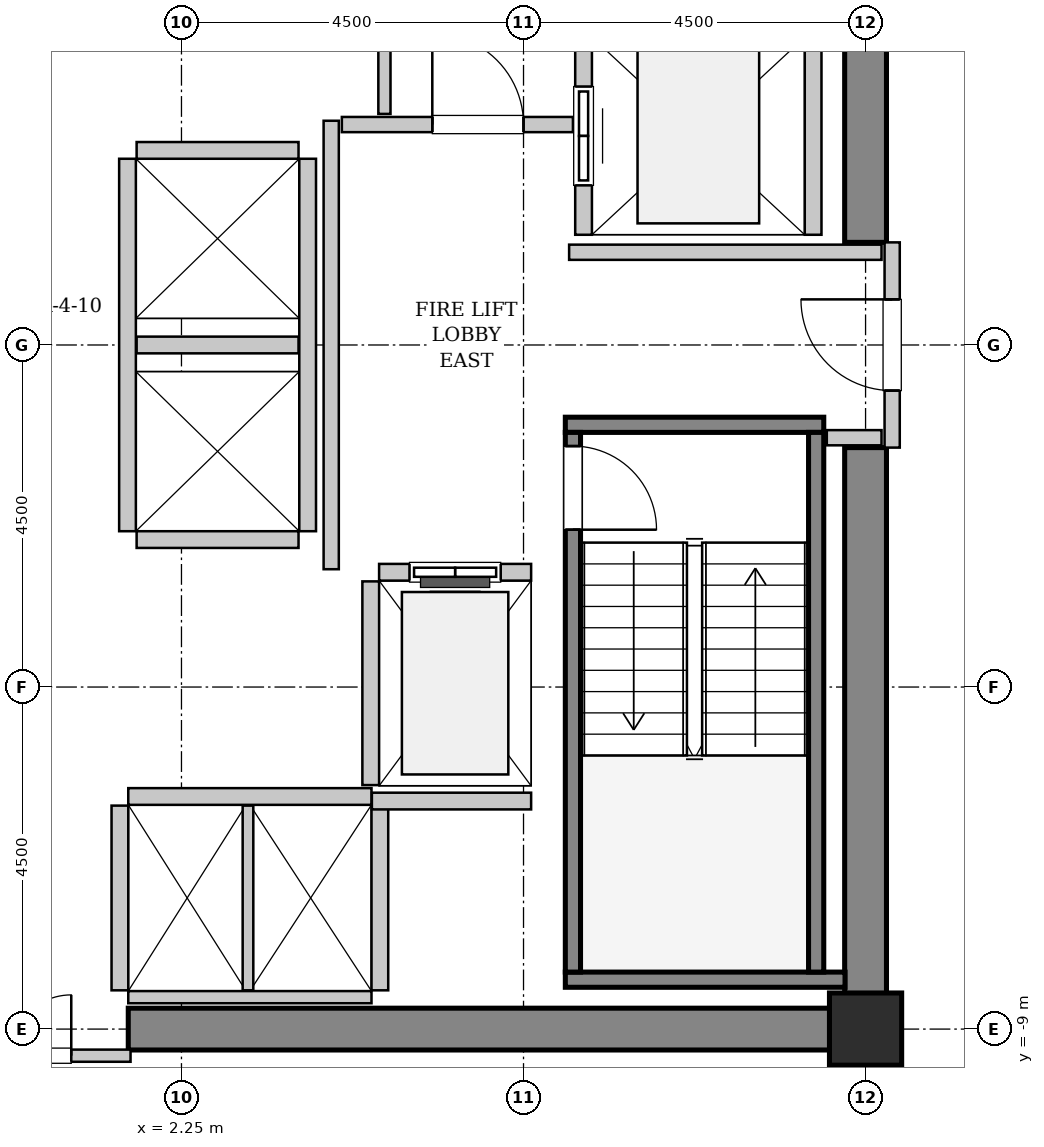
"""IFC4 building model, lengths in metres.
Left out: names, types, materials, properties, quantities, classifications, styles, units other than length and angle.
Written with IfcOpenShell. Run it as: python <this file> out.ifc"""

import sys

from ifc_helpers import new_model, si_unit, direction, frame, frame_2d, origin, origin_2d, place, context, subcontext, project, spatial, rectangle, hollow_rectangle, extrude, source, transform, mapped, element, fill, save


model = new_model("IFC4")
c1 = context("Model", 3, precision=1e-05, world=origin(), true_north=direction((0.0, 1.0)))
c2 = subcontext(c1, "Body", "Model", "MODEL_VIEW")
j1 = project(units=[si_unit("LENGTHUNIT", "METRE"), si_unit("PLANEANGLEUNIT", "RADIAN")], contexts=[c1])
p1 = place(None, origin())
s1 = spatial("IfcSite", under=j1, at=p1, CompositionType="ELEMENT")
p2 = place(p1, origin())
s2 = spatial("IfcBuilding", under=s1, at=p2, CompositionType="ELEMENT")
p3 = place(p2, frame((0.0, 0.0, 113.6)))
s3 = spatial("IfcBuildingStorey", under=s2, at=p3, CompositionType="ELEMENT", Elevation=113.6)
m1 = source(origin(), c2, "Body", "SweptSolid", [
    extrude(rectangle(XDim=9.975, YDim=0.55, at=frame_2d((4.987, 0.0))), origin(), (0.0, 0.0, 1.0), 3.8),
])
p4 = place(p3, frame((1.55, -9.0, 0.0), z_axis=(0.0, 0.0, 1.0), x_axis=(1.0, 0.0, 0.0)))
e1 = element("IfcWall", 1, at=p4, inside=s3, PredefinedType="SHEAR", context=c2, shape_type="MappedRepresentation", body=[
    mapped(m1, transform((0.0, 0.0, 0.0), x_axis=(1.0, 0.0, 0.0), y_axis=(0.0, 1.0, 0.0), z_axis=(0.0, 0.0, 1.0), scale=1.0)),
])
m2 = source(origin(), c2, "Body", "SweptSolid", [
    extrude(rectangle(XDim=7.375, YDim=0.55, at=frame_2d((3.688, 0.0))), origin(), (0.0, 0.0, 1.0), 3.8),
])
for number, where, z_axis, x_axis in (
    (2, (11.25, -8.725, 0.0), (0.0, 0.0, 1.0), (0.0, 1.0, 0.0)),
    (3, (11.25, 1.35, 0.0), (0.0, 0.0, 1.0), (0.0, 1.0, 0.0)),
):
    element("IfcWall", number, at=place(p3, frame(where, z_axis=z_axis, x_axis=x_axis)), inside=s3, PredefinedType="SHEAR", context=c2, shape_type="MappedRepresentation", body=[
        mapped(m2, transform((0.0, 0.0, 0.0), x_axis=(1.0, 0.0, 0.0), y_axis=(0.0, 1.0, 0.0), z_axis=(0.0, 0.0, 1.0), scale=1.0)),
    ])
m3 = source(origin(), c2, "Body", "SweptSolid", [
    extrude(hollow_rectangle(XDim=0.95, YDim=0.95, WallThickness=0.045, InnerFilletRadius=0.045, OuterFilletRadius=0.09, at=origin_2d()), origin(), (0.0, 0.0, 1.0), 3.8),
])
p5 = place(p3, frame((11.25, -9.0, 0.0), z_axis=(0.0, 0.0, 1.0), x_axis=(1.0, 0.0, 0.0)))
e4 = element("IfcColumn", 4, at=p5, inside=s3, PredefinedType="COLUMN", context=c2, shape_type="MappedRepresentation", body=[
    mapped(m3, transform((0.0, 0.0, 0.0), x_axis=(1.0, 0.0, 0.0), y_axis=(0.0, 1.0, 0.0), z_axis=(0.0, 0.0, 1.0), scale=1.0)),
])
m4 = source(origin(), c2, "Body", "SweptSolid", [
    extrude(rectangle(XDim=3.4, YDim=0.2, at=frame_2d((1.7, 0.0))), origin(), (0.0, 0.0, 1.0), 3.8),
])
p6 = place(p3, frame((7.3, -1.05, 0.0), z_axis=(0.0, 0.0, 1.0), x_axis=(1.0, 0.0, 0.0)))
e5 = element("IfcWall", 5, at=p6, inside=s3, PredefinedType="SOLIDWALL", context=c2, shape_type="MappedRepresentation", body=[
    mapped(m4, transform((0.0, 0.0, 0.0), x_axis=(1.0, 0.0, 0.0), y_axis=(0.0, 1.0, 0.0), z_axis=(0.0, 0.0, 1.0), scale=1.0)),
])
m5 = source(origin(), c2, "Body", "SweptSolid", [
    extrude(rectangle(XDim=3.68, YDim=0.2, at=frame_2d((1.84, 0.0))), origin(), (0.0, 0.0, 1.0), 3.8),
])
p7 = place(p3, frame((7.3, -8.35, 0.0), z_axis=(0.0, 0.0, 1.0), x_axis=(1.0, 0.0, 0.0)))
e6 = element("IfcWall", 6, at=p7, inside=s3, PredefinedType="SOLIDWALL", context=c2, shape_type="MappedRepresentation", body=[
    mapped(m5, transform((0.0, 0.0, 0.0), x_axis=(1.0, 0.0, 0.0), y_axis=(0.0, 1.0, 0.0), z_axis=(0.0, 0.0, 1.0), scale=1.0)),
])
m6 = source(origin(), c2, "Body", "SweptSolid", [
    extrude(rectangle(XDim=7.1, YDim=0.2, at=frame_2d((3.55, 0.0))), origin(), (0.0, 0.0, 1.0), 3.8),
])
p8 = place(p3, frame((7.4, -1.15, 0.0), z_axis=(0.0, 0.0, 1.0), x_axis=(0.0, -1.0, 0.0)))
e7 = element("IfcWall", 7, at=p8, inside=s3, PredefinedType="SOLIDWALL", context=c2, shape_type="MappedRepresentation", body=[
    mapped(m6, transform((0.0, 0.0, 0.0), x_axis=(1.0, 0.0, 0.0), y_axis=(0.0, 1.0, 0.0), z_axis=(0.0, 0.0, 1.0), scale=1.0)),
])
p9 = place(p8, frame((0.18, 0.0, 0.0)))
e8 = element("IfcOpeningElement", 8, at=p9, cuts=e7, PredefinedType="OPENING", context=c2, shape_type="SweptSolid", body=[
    extrude(rectangle(XDim=1.1, YDim=2.15, at=frame_2d((0.55, 1.075))), frame((0.0, 0.11, 0.0), z_axis=(0.0, -1.0, 0.0), x_axis=(1.0, 0.0, 0.0)), (0.0, 0.0, 1.0), 0.22),
])
p10 = place(p3, frame((10.6, -1.15, 0.0), z_axis=(0.0, 0.0, 1.0), x_axis=(0.0, -1.0, 0.0)))
e9 = element("IfcWall", 9, at=p10, inside=s3, PredefinedType="SOLIDWALL", context=c2, shape_type="MappedRepresentation", body=[
    mapped(m6, transform((0.0, 0.0, 0.0), x_axis=(1.0, 0.0, 0.0), y_axis=(0.0, 1.0, 0.0), z_axis=(0.0, 0.0, 1.0), scale=1.0)),
])
m7 = source(origin(), c2, "Body", "SweptSolid", [
    extrude(rectangle(XDim=2.0, YDim=0.22, at=frame_2d((1.0, 0.0))), origin(), (0.0, 0.0, 1.0), 3.535),
])
p11 = place(p3, frame((6.85, -2.99, 0.0), z_axis=(0.0, 0.0, 1.0), x_axis=(-1.0, 0.0, 0.0)))
e10 = element("IfcWall", 10, at=p11, inside=s3, PredefinedType="SOLIDWALL", context=c2, shape_type="MappedRepresentation", body=[
    mapped(m7, transform((0.0, 0.0, 0.0), x_axis=(1.0, 0.0, 0.0), y_axis=(0.0, 1.0, 0.0), z_axis=(0.0, 0.0, 1.0), scale=1.0)),
])
p12 = place(p11, frame((0.4, 0.0, 0.0)))
e11 = element("IfcOpeningElement", 11, at=p12, cuts=e10, PredefinedType="OPENING", context=c2, shape_type="SweptSolid", body=[
    extrude(rectangle(XDim=1.2, YDim=2.2, at=frame_2d((0.6, 1.1))), frame((0.0, 0.12, 0.0), z_axis=(0.0, -1.0, 0.0), x_axis=(1.0, 0.0, 0.0)), (0.0, 0.0, 1.0), 0.24),
])
m8 = source(origin(), c2, "Body", "SweptSolid", [
    extrude(rectangle(XDim=2.68, YDim=0.22, at=frame_2d((1.34, 0.0))), origin(), (0.0, 0.0, 1.0), 3.535),
])
p13 = place(p3, frame((4.74, -3.11, 0.0), z_axis=(0.0, 0.0, 1.0), x_axis=(0.0, -1.0, 0.0)))
e12 = element("IfcWall", 12, at=p13, inside=s3, PredefinedType="SOLIDWALL", context=c2, shape_type="MappedRepresentation", body=[
    mapped(m8, transform((0.0, 0.0, 0.0), x_axis=(1.0, 0.0, 0.0), y_axis=(0.0, 1.0, 0.0), z_axis=(0.0, 0.0, 1.0), scale=1.0)),
])
m9 = source(origin(), c2, "Body", "SweptSolid", [
    extrude(rectangle(XDim=5.45, YDim=0.22, at=frame_2d((2.725, 0.0))), origin(), (0.0, 0.0, 1.0), 3.535),
])
p14 = place(p3, frame((7.54, 6.9, 0.0), z_axis=(0.0, 0.0, 1.0), x_axis=(0.0, -1.0, 0.0)))
e13 = element("IfcWall", 13, at=p14, inside=s3, PredefinedType="SOLIDWALL", context=c2, shape_type="MappedRepresentation", body=[
    mapped(m9, transform((0.0, 0.0, 0.0), x_axis=(1.0, 0.0, 0.0), y_axis=(0.0, 1.0, 0.0), z_axis=(0.0, 0.0, 1.0), scale=1.0)),
])
p15 = place(p14, frame((3.5, 0.0, 0.0)))
e14 = element("IfcOpeningElement", 14, at=p15, cuts=e13, PredefinedType="OPENING", context=c2, shape_type="SweptSolid", body=[
    extrude(rectangle(XDim=1.3, YDim=2.3, at=frame_2d((0.65, 1.15))), frame((0.0, 0.12, 0.0), z_axis=(0.0, -1.0, 0.0), x_axis=(1.0, 0.0, 0.0)), (0.0, 0.0, 1.0), 0.24),
])
p16 = place(p14, frame((0.65, 0.0, 0.0)))
e15 = element("IfcOpeningElement", 15, at=p16, cuts=e13, PredefinedType="OPENING", context=c2, shape_type="SweptSolid", body=[
    extrude(rectangle(XDim=1.3, YDim=2.3, at=frame_2d((0.65, 1.15))), frame((0.0, 0.12, 0.0), z_axis=(0.0, -1.0, 0.0), x_axis=(1.0, 0.0, 0.0)), (0.0, 0.0, 1.0), 0.24),
])
p17 = place(p3, frame((10.56, 1.45, 0.0), z_axis=(0.0, 0.0, 1.0), x_axis=(0.0, 1.0, 0.0)))
e16 = element("IfcWall", 16, at=p17, inside=s3, PredefinedType="SOLIDWALL", context=c2, shape_type="MappedRepresentation", body=[
    mapped(m9, transform((0.0, 0.0, 0.0), x_axis=(1.0, 0.0, 0.0), y_axis=(0.0, 1.0, 0.0), z_axis=(0.0, 0.0, 1.0), scale=1.0)),
])
m10 = source(origin(), c2, "Body", "SweptSolid", [
    extrude(rectangle(XDim=3.2, YDim=0.22, at=frame_2d((1.6, 0.0))), origin(), (0.0, 0.0, 1.0), 3.535),
])
p18 = place(p3, frame((4.75, -5.94, 0.0), z_axis=(0.0, 0.0, 1.0), x_axis=(-1.0, 0.0, 0.0)))
e17 = element("IfcWall", 17, at=p18, inside=s3, PredefinedType="SOLIDWALL", context=c2, shape_type="MappedRepresentation", body=[
    mapped(m10, transform((0.0, 0.0, 0.0), x_axis=(1.0, 0.0, 0.0), y_axis=(0.0, 1.0, 0.0), z_axis=(0.0, 0.0, 1.0), scale=1.0)),
])
m11 = source(origin(), c2, "Body", "SweptSolid", [
    extrude(rectangle(XDim=3.2, YDim=0.16, at=frame_2d((1.6, 0.0))), origin(), (0.0, 0.0, 1.0), 2.425),
])
p19 = place(p3, frame((1.55, -8.58, 0.0), z_axis=(0.0, 0.0, 1.0), x_axis=(1.0, 0.0, 0.0)))
e18 = element("IfcWall", 18, at=p19, inside=s3, PredefinedType="PARTITIONING", context=c2, shape_type="MappedRepresentation", body=[
    mapped(m11, transform((0.0, 0.0, 0.0), x_axis=(1.0, 0.0, 0.0), y_axis=(0.0, 1.0, 0.0), z_axis=(0.0, 0.0, 1.0), scale=1.0)),
])
m12 = source(origin(), c2, "Body", "SweptSolid", [
    extrude(rectangle(XDim=2.43, YDim=0.22, at=frame_2d((1.215, 0.0))), origin(), (0.0, 0.0, 1.0), 3.535),
])
p20 = place(p3, frame((1.44, -6.06, 0.0), z_axis=(0.0, 0.0, 1.0), x_axis=(0.0, -1.0, 0.0)))
e19 = element("IfcWall", 19, at=p20, inside=s3, PredefinedType="SOLIDWALL", context=c2, shape_type="MappedRepresentation", body=[
    mapped(m12, transform((0.0, 0.0, 0.0), x_axis=(1.0, 0.0, 0.0), y_axis=(0.0, 1.0, 0.0), z_axis=(0.0, 0.0, 1.0), scale=1.0)),
])
m13 = source(origin(), c2, "Body", "SweptSolid", [
    extrude(rectangle(XDim=2.43, YDim=0.14, at=frame_2d((1.215, 0.0))), origin(), (0.0, 0.0, 1.0), 3.535),
])
p21 = place(p3, frame((3.125, -8.49, 0.0), z_axis=(0.0, 0.0, 1.0), x_axis=(0.0, 1.0, 0.0)))
e20 = element("IfcWall", 20, at=p21, inside=s3, PredefinedType="PARTITIONING", context=c2, shape_type="MappedRepresentation", body=[
    mapped(m13, transform((0.0, 0.0, 0.0), x_axis=(1.0, 0.0, 0.0), y_axis=(0.0, 1.0, 0.0), z_axis=(0.0, 0.0, 1.0), scale=1.0)),
])
p22 = place(p3, frame((4.86, -8.49, 0.0), z_axis=(0.0, 0.0, 1.0), x_axis=(0.0, 1.0, 0.0)))
e21 = element("IfcWall", 21, at=p22, inside=s3, PredefinedType="SOLIDWALL", context=c2, shape_type="MappedRepresentation", body=[
    mapped(m12, transform((0.0, 0.0, 0.0), x_axis=(1.0, 0.0, 0.0), y_axis=(0.0, 1.0, 0.0), z_axis=(0.0, 0.0, 1.0), scale=1.0)),
])
m14 = source(origin(), c2, "Body", "SweptSolid", [
    extrude(rectangle(XDim=4.9, YDim=0.22, at=frame_2d((2.45, 0.0))), origin(), (0.0, 0.0, 1.0), 3.535),
])
for number, where, z_axis, x_axis in (
    (22, (1.54, 2.45, 0.0), (0.0, 0.0, 1.0), (0.0, -1.0, 0.0)),
    (23, (3.91, -2.45, 0.0), (0.0, 0.0, 1.0), (0.0, 1.0, 0.0)),
):
    element("IfcWall", number, at=place(p3, frame(where, z_axis=z_axis, x_axis=x_axis)), inside=s3, PredefinedType="SOLIDWALL", context=c2, shape_type="MappedRepresentation", body=[
        mapped(m14, transform((0.0, 0.0, 0.0), x_axis=(1.0, 0.0, 0.0), y_axis=(0.0, 1.0, 0.0), z_axis=(0.0, 0.0, 1.0), scale=1.0)),
    ])
m15 = source(origin(), c2, "Body", "SweptSolid", [
    extrude(rectangle(XDim=2.13, YDim=0.22, at=frame_2d((1.065, 0.0))), origin(), (0.0, 0.0, 1.0), 3.535),
])
for number, where, z_axis, x_axis in (
    (24, (1.66, -2.56, 0.0), (0.0, 0.0, 1.0), (1.0, 0.0, 0.0)),
    (25, (1.66, 0.0, 0.0), (0.0, 0.0, 1.0), (1.0, 0.0, 0.0)),
    (26, (3.79, 2.56, 0.0), (0.0, 0.0, 1.0), (-1.0, 0.0, 0.0)),
):
    element("IfcWall", number, at=place(p3, frame(where, z_axis=z_axis, x_axis=x_axis)), inside=s3, PredefinedType="SOLIDWALL", context=c2, shape_type="MappedRepresentation", body=[
        mapped(m15, transform((0.0, 0.0, 0.0), x_axis=(1.0, 0.0, 0.0), y_axis=(0.0, 1.0, 0.0), z_axis=(0.0, 0.0, 1.0), scale=1.0)),
    ])
m16 = source(origin(), c2, "Body", "SweptSolid", [
    extrude(rectangle(XDim=2.095, YDim=0.22, at=frame_2d((1.048, 0.0))), origin(), (0.0, 0.0, 1.0), 3.535),
])
p23 = place(p3, frame((4.755, -6.0, 0.0), z_axis=(0.0, 0.0, 1.0), x_axis=(1.0, 0.0, 0.0)))
e27 = element("IfcWall", 27, at=p23, inside=s3, PredefinedType="SOLIDWALL", context=c2, shape_type="MappedRepresentation", body=[
    mapped(m16, transform((0.0, 0.0, 0.0), x_axis=(1.0, 0.0, 0.0), y_axis=(0.0, 1.0, 0.0), z_axis=(0.0, 0.0, 1.0), scale=1.0)),
])
m17 = source(origin(), c2, "Body", "SweptSolid", [
    extrude(rectangle(XDim=2.7, YDim=0.2, at=frame_2d((1.35, 0.0))), origin(), (0.0, 0.0, 1.0), 2.425),
])
p24 = place(p3, frame((11.6, -1.35, 0.0), z_axis=(0.0, 0.0, 1.0), x_axis=(0.0, 1.0, 0.0)))
e28 = element("IfcWall", 28, at=p24, inside=s3, PredefinedType="PARTITIONING", context=c2, shape_type="MappedRepresentation", body=[
    mapped(m17, transform((0.0, 0.0, 0.0), x_axis=(1.0, 0.0, 0.0), y_axis=(0.0, 1.0, 0.0), z_axis=(0.0, 0.0, 1.0), scale=1.0)),
])
p25 = place(p24, frame((0.75, 0.0, 0.0)))
e29 = element("IfcOpeningElement", 29, at=p25, cuts=e28, PredefinedType="OPENING", context=c2, shape_type="SweptSolid", body=[
    extrude(rectangle(XDim=1.2, YDim=2.15, at=frame_2d((0.6, 1.075))), frame((0.0, 0.11, 0.0), z_axis=(0.0, -1.0, 0.0), x_axis=(1.0, 0.0, 0.0)), (0.0, 0.0, 1.0), 0.22),
])
m18 = source(origin(), c2, "Body", "SweptSolid", [
    extrude(rectangle(XDim=5.9, YDim=0.2, at=frame_2d((2.95, 0.0))), origin(), (0.0, 0.0, 1.0), 3.535),
])
p26 = place(p3, frame((4.22, -2.95, 0.0), z_axis=(0.0, 0.0, 1.0), x_axis=(0.0, 1.0, 0.0)))
e30 = element("IfcWall", 30, at=p26, inside=s3, PredefinedType="PARTITIONING", context=c2, shape_type="MappedRepresentation", body=[
    mapped(m18, transform((0.0, 0.0, 0.0), x_axis=(1.0, 0.0, 0.0), y_axis=(0.0, 1.0, 0.0), z_axis=(0.0, 0.0, 1.0), scale=1.0)),
])
m19 = source(origin(), c2, "Body", "SweptSolid", [
    extrude(rectangle(XDim=3.04, YDim=0.2, at=frame_2d((1.52, 0.0))), origin(), (0.0, 0.0, 1.0), 3.535),
])
p27 = place(p3, frame((4.36, 2.9, 0.0), z_axis=(0.0, 0.0, 1.0), x_axis=(1.0, 0.0, 0.0)))
e31 = element("IfcWall", 31, at=p27, inside=s3, PredefinedType="PARTITIONING", context=c2, shape_type="MappedRepresentation", body=[
    mapped(m19, transform((0.0, 0.0, 0.0), x_axis=(1.0, 0.0, 0.0), y_axis=(0.0, 1.0, 0.0), z_axis=(0.0, 0.0, 1.0), scale=1.0)),
])
p28 = place(p27, frame((1.19, 0.0, 0.0)))
e32 = element("IfcOpeningElement", 32, at=p28, cuts=e31, PredefinedType="OPENING", context=c2, shape_type="SweptSolid", body=[
    extrude(rectangle(XDim=1.2, YDim=2.15, at=frame_2d((0.6, 1.075))), frame((0.0, 0.11, 0.0), z_axis=(0.0, -1.0, 0.0), x_axis=(1.0, 0.0, 0.0)), (0.0, 0.0, 1.0), 0.22),
])
m20 = source(origin(), c2, "Body", "SweptSolid", [
    extrude(rectangle(XDim=4.11, YDim=0.2, at=frame_2d((2.055, 0.0))), origin(), (0.0, 0.0, 1.0), 3.535),
])
p29 = place(p3, frame((7.35, 1.22, 0.0), z_axis=(0.0, 0.0, 1.0), x_axis=(1.0, 0.0, 0.0)))
e33 = element("IfcWall", 33, at=p29, inside=s3, PredefinedType="PARTITIONING", context=c2, shape_type="MappedRepresentation", body=[
    mapped(m20, transform((0.0, 0.0, 0.0), x_axis=(1.0, 0.0, 0.0), y_axis=(0.0, 1.0, 0.0), z_axis=(0.0, 0.0, 1.0), scale=1.0)),
])
m21 = source(origin(), c2, "Body", "SweptSolid", [
    extrude(rectangle(XDim=0.72, YDim=0.2, at=frame_2d((0.36, 0.0))), origin(), (0.0, 0.0, 1.0), 3.535),
])
p30 = place(p3, frame((10.74, -1.22, 0.0), z_axis=(0.0, 0.0, 1.0), x_axis=(1.0, 0.0, 0.0)))
e34 = element("IfcWall", 34, at=p30, inside=s3, PredefinedType="PARTITIONING", context=c2, shape_type="MappedRepresentation", body=[
    mapped(m21, transform((0.0, 0.0, 0.0), x_axis=(1.0, 0.0, 0.0), y_axis=(0.0, 1.0, 0.0), z_axis=(0.0, 0.0, 1.0), scale=1.0)),
])
m22 = source(origin(), c2, "Body", "SweptSolid", [
    extrude(rectangle(XDim=3.16, YDim=0.16, at=frame_2d((1.58, 0.0))), origin(), (0.0, 0.0, 1.0), 2.425),
])
p31 = place(p3, frame((-1.58, -9.35, 0.0), z_axis=(0.0, 0.0, 1.0), x_axis=(1.0, 0.0, 0.0)))
e35 = element("IfcWall", 35, at=p31, inside=s3, PredefinedType="PARTITIONING", context=c2, shape_type="MappedRepresentation", body=[
    mapped(m22, transform((0.0, 0.0, 0.0), x_axis=(1.0, 0.0, 0.0), y_axis=(0.0, 1.0, 0.0), z_axis=(0.0, 0.0, 1.0), scale=1.0)),
])
p32 = place(p31, frame((0.78, 0.0, 0.0)))
e36 = element("IfcOpeningElement", 36, at=p32, cuts=e35, PredefinedType="OPENING", context=c2, shape_type="SweptSolid", body=[
    extrude(rectangle(XDim=1.6, YDim=2.3, at=frame_2d((0.8, 1.15))), frame((0.0, 0.09, 0.0), z_axis=(0.0, -1.0, 0.0), x_axis=(1.0, 0.0, 0.0)), (0.0, 0.0, 1.0), 0.18),
])
m23 = source(origin(), c2, "Body", "SweptSolid", [
    extrude(rectangle(XDim=3.015, YDim=0.16, at=frame_2d((1.507, 0.0))), origin(), (0.0, 0.0, 1.0), 3.535),
])
p33 = place(p3, frame((4.92, 3.04, 0.0), z_axis=(0.0, 0.0, 1.0), x_axis=(0.0, 1.0, 0.0)))
e37 = element("IfcWall", 37, at=p33, inside=s3, PredefinedType="PARTITIONING", context=c2, shape_type="MappedRepresentation", body=[
    mapped(m23, transform((0.0, 0.0, 0.0), x_axis=(1.0, 0.0, 0.0), y_axis=(0.0, 1.0, 0.0), z_axis=(0.0, 0.0, 1.0), scale=1.0)),
])
m24 = source(origin(), c2, "Body", "SweptSolid", [
    extrude(rectangle(XDim=1.1, YDim=2.15, at=frame_2d((0.55, 1.075))), frame((0.0, 0.025, 0.0), z_axis=(0.0, -1.0, 0.0), x_axis=(1.0, 0.0, 0.0)), (0.0, 0.0, 1.0), 0.05),
])
p34 = place(p9, origin())
e38 = element("IfcDoor", 38, at=p34, inside=s3, OperationType="SINGLE_SWING_RIGHT", PredefinedType="DOOR", context=c2, shape_type="MappedRepresentation", body=[
    mapped(m24, transform((0.0, 0.0, 0.0), x_axis=(1.0, 0.0, 0.0), y_axis=(0.0, 1.0, 0.0), z_axis=(0.0, 0.0, 1.0), scale=1.0)),
])
fill(e8, e38)
m25 = source(origin(), c2, "Body", "SweptSolid", [
    extrude(rectangle(XDim=1.2, YDim=2.2, at=frame_2d((0.6, 1.1))), frame((0.0, 0.025, 0.0), z_axis=(0.0, -1.0, 0.0), x_axis=(1.0, 0.0, 0.0)), (0.0, 0.0, 1.0), 0.05),
])
p35 = place(p12, origin())
e39 = element("IfcDoor", 39, at=p35, inside=s3, OperationType="SLIDING_TO_LEFT", PredefinedType="DOOR", context=c2, shape_type="MappedRepresentation", body=[
    mapped(m25, transform((0.0, 0.0, 0.0), x_axis=(1.0, 0.0, 0.0), y_axis=(0.0, 1.0, 0.0), z_axis=(0.0, 0.0, 1.0), scale=1.0)),
])
fill(e11, e39)
m26 = source(origin(), c2, "Body", "SweptSolid", [
    extrude(rectangle(XDim=1.3, YDim=2.3, at=frame_2d((0.65, 1.15))), frame((0.0, 0.025, 0.0), z_axis=(0.0, -1.0, 0.0), x_axis=(1.0, 0.0, 0.0)), (0.0, 0.0, 1.0), 0.05),
])
p36 = place(p15, origin())
e40 = element("IfcDoor", 40, at=p36, inside=s3, OperationType="SLIDING_TO_RIGHT", PredefinedType="DOOR", context=c2, shape_type="MappedRepresentation", body=[
    mapped(m26, transform((0.0, 0.0, 0.0), x_axis=(1.0, 0.0, 0.0), y_axis=(0.0, 1.0, 0.0), z_axis=(0.0, 0.0, 1.0), scale=1.0)),
])
fill(e14, e40)
m27 = source(origin(), c2, "Body", "SweptSolid", [
    extrude(rectangle(XDim=1.2, YDim=2.15, at=frame_2d((0.6, 1.075))), frame((0.0, 0.025, 0.0), z_axis=(0.0, -1.0, 0.0), x_axis=(1.0, 0.0, 0.0)), (0.0, 0.0, 1.0), 0.05),
])
p37 = place(p25, origin())
e41 = element("IfcDoor", 41, at=p37, inside=s3, OperationType="SINGLE_SWING_RIGHT", PredefinedType="DOOR", context=c2, shape_type="MappedRepresentation", body=[
    mapped(m27, transform((0.0, 0.0, 0.0), x_axis=(1.0, 0.0, 0.0), y_axis=(0.0, 1.0, 0.0), z_axis=(0.0, 0.0, 1.0), scale=1.0)),
])
fill(e29, e41)
p38 = place(p28, origin())
e42 = element("IfcDoor", 42, at=p38, inside=s3, OperationType="SINGLE_SWING_LEFT", PredefinedType="DOOR", context=c2, shape_type="MappedRepresentation", body=[
    mapped(m27, transform((0.0, 0.0, 0.0), x_axis=(1.0, 0.0, 0.0), y_axis=(0.0, 1.0, 0.0), z_axis=(0.0, 0.0, 1.0), scale=1.0)),
])
fill(e32, e42)
m28 = source(origin(), c2, "Body", "SweptSolid", [
    extrude(rectangle(XDim=1.6, YDim=2.3, at=frame_2d((0.8, 1.15))), frame((0.0, 0.025, 0.0), z_axis=(0.0, -1.0, 0.0), x_axis=(1.0, 0.0, 0.0)), (0.0, 0.0, 1.0), 0.05),
])
p39 = place(p32, origin())
e43 = element("IfcDoor", 43, at=p39, inside=s3, OperationType="DOUBLE_DOOR_SINGLE_SWING", PredefinedType="DOOR", context=c2, shape_type="MappedRepresentation", body=[
    mapped(m28, transform((0.0, 0.0, 0.0), x_axis=(1.0, 0.0, 0.0), y_axis=(0.0, 1.0, 0.0), z_axis=(0.0, 0.0, 1.0), scale=1.0)),
])
fill(e36, e43)
save(model, sys.argv[1])
